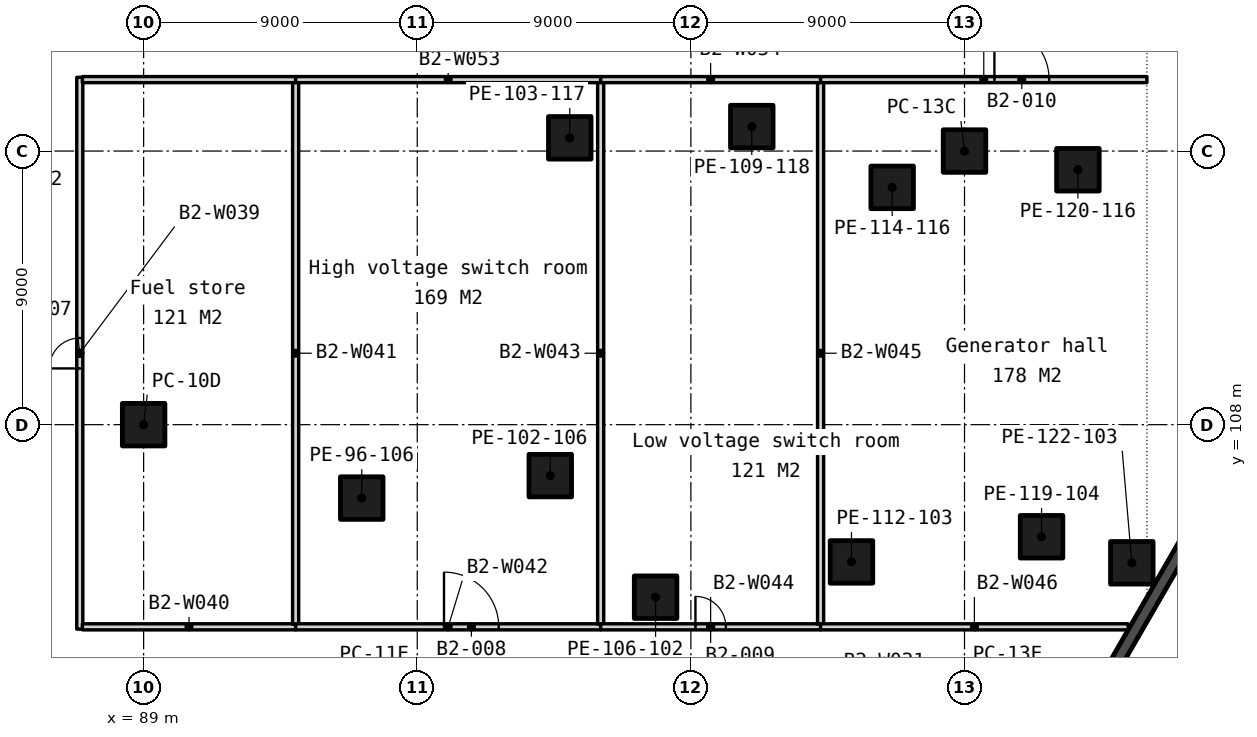
"""IFC4 building model, lengths in metres.
Left out: names, types, materials, properties, quantities, classifications, styles, units other than length and angle.
Written with IfcOpenShell. Run it as: python <this file> out.ifc"""

import sys

from ifc_helpers import new_model, si_unit, direction, frame, frame_2d, origin, origin_2d, place, context, subcontext, project, spatial, rectangle, extrude, element, fill, save


model = new_model("IFC4")
c1 = context("Model", 3, precision=1e-05, world=origin(), true_north=direction((0.0, 1.0)))
c2 = subcontext(c1, "Body", "Model", "MODEL_VIEW")
j1 = project(units=[si_unit("LENGTHUNIT", "METRE"), si_unit("PLANEANGLEUNIT", "RADIAN")], contexts=[c1])
p1 = place(None, origin())
s1 = spatial("IfcSite", under=j1, at=p1, CompositionType="ELEMENT")
p2 = place(p1, origin())
s2 = spatial("IfcBuilding", under=s1, at=p2, CompositionType="ELEMENT")
p3 = place(p2, frame((0.0, 0.0, -9.0)))
s3 = spatial("IfcBuildingStorey", under=s2, at=p3, CompositionType="ELEMENT", Elevation=-9.0)
p4 = place(p3, frame((137.688, 129.089, -0.3), z_axis=(0.0, 0.0, 1.0), x_axis=(-0.499999742059, -0.866025552707, 0.0)))
e1 = element("IfcWall", 1, at=p4, inside=s3, PredefinedType="SOLIDWALL", context=c2, shape_type="SweptSolid", body=[
    extrude(rectangle(XDim=105.659, YDim=0.4, at=frame_2d((52.829, 0.0))), origin(), (0.0, 0.0, 1.0), 4.55),
])
for number, where, z_axis, x_axis in (
    (2, (89.0, 108.0, 0.0), (0.0, 0.0, 1.0), (1.0, 0.0, 0.0)),
    (3, (116.0, 117.0, 0.0), (0.0, 0.0, 1.0), (1.0, 0.0, 0.0)),
    (4, (102.375, 106.325, 0.0), (0.0, 0.0, 1.0), (1.0, 0.0, 0.0)),
    (5, (103.016, 117.435, 0.0), (0.0, 0.0, 1.0), (1.0, 0.0, 0.0)),
    (6, (105.839, 102.325, 0.0), (0.0, 0.0, 1.0), (1.0, 0.0, 0.0)),
    (7, (109.003, 117.805, 0.0), (0.0, 0.0, 1.0), (1.0, 0.0, 0.0)),
    (8, (112.282, 103.485, 0.0), (0.0, 0.0, 1.0), (1.0, 0.0, 0.0)),
    (9, (113.621, 115.805, 0.0), (0.0, 0.0, 1.0), (1.0, 0.0, 0.0)),
    (10, (118.534, 104.313, 0.0), (0.0, 0.0, 1.0), (1.0, 0.0, 0.0)),
    (11, (119.73, 116.385, 0.0), (0.0, 0.0, 1.0), (1.0, 0.0, 0.0)),
    (12, (121.503, 103.456, 0.0), (0.0, 0.0, 1.0), (1.0, 0.0, 0.0)),
    (13, (96.174, 105.585, 0.0), (0.0, 0.0, 1.0), (1.0, 0.0, 0.0)),
):
    element("IfcColumn", number, at=place(p3, frame(where, z_axis=z_axis, x_axis=x_axis)), inside=s3, PredefinedType="COLUMN", context=c2, shape_type="SweptSolid", body=[
        extrude(rectangle(XDim=1.4, YDim=1.4, at=origin_2d()), origin(), (0.0, 0.0, 1.0), 4.5),
    ])
p5 = place(p3, frame((86.9, 101.275, 0.0), z_axis=(0.0, 0.0, 1.0), x_axis=(0.0, 1.0, 0.0)))
e14 = element("IfcWall", 14, at=p5, inside=s3, PredefinedType="PARTITIONING", context=c2, shape_type="SweptSolid", body=[
    extrude(rectangle(XDim=18.15, YDim=0.2, at=frame_2d((9.075, 0.0))), origin(), (0.0, 0.0, 1.0), 4.25),
])
p6 = place(p5, frame((8.575, 0.0, 0.0)))
e15 = element("IfcOpeningElement", 15, at=p6, cuts=e14, PredefinedType="OPENING", context=c2, shape_type="SweptSolid", body=[
    extrude(rectangle(XDim=1.0, YDim=2.1, at=frame_2d((0.5, 1.05))), frame((0.0, 0.11, 0.0), z_axis=(0.0, -1.0, 0.0), x_axis=(1.0, 0.0, 0.0)), (0.0, 0.0, 1.0), 0.22),
])
p7 = place(p3, frame((86.985, 101.35, 0.0), z_axis=(0.0, 0.0, 1.0), x_axis=(1.0, 0.0, 0.0)))
e16 = element("IfcWall", 16, at=p7, inside=s3, PredefinedType="PARTITIONING", context=c2, shape_type="SweptSolid", body=[
    extrude(rectangle(XDim=7.015, YDim=0.2, at=frame_2d((3.507, 0.0))), origin(), (0.0, 0.0, 1.0), 4.25),
])
p8 = place(p3, frame((94.0, 101.435, 0.0), z_axis=(0.0, 0.0, 1.0), x_axis=(0.0, 1.0, 0.0)))
e17 = element("IfcWall", 17, at=p8, inside=s3, PredefinedType="PARTITIONING", context=c2, shape_type="SweptSolid", body=[
    extrude(rectangle(XDim=17.83, YDim=0.2, at=frame_2d((8.915, 0.0))), origin(), (0.0, 0.0, 1.0), 4.25),
])
p9 = place(p3, frame((94.0, 101.35, 0.0), z_axis=(0.0, 0.0, 1.0), x_axis=(1.0, 0.0, 0.0)))
e18 = element("IfcWall", 18, at=p9, inside=s3, PredefinedType="PARTITIONING", context=c2, shape_type="SweptSolid", body=[
    extrude(rectangle(XDim=10.033, YDim=0.2, at=frame_2d((5.017, 0.0))), origin(), (0.0, 0.0, 1.0), 4.25),
])
p10 = place(p9, frame((4.88, 0.0, 0.0)))
e19 = element("IfcOpeningElement", 19, at=p10, cuts=e18, PredefinedType="OPENING", context=c2, shape_type="SweptSolid", body=[
    extrude(rectangle(XDim=1.8, YDim=2.1, at=frame_2d((0.9, 1.05))), frame((0.0, 0.11, 0.0), z_axis=(0.0, -1.0, 0.0), x_axis=(1.0, 0.0, 0.0)), (0.0, 0.0, 1.0), 0.22),
])
p11 = place(p3, frame((104.033, 101.435, 0.0), z_axis=(0.0, 0.0, 1.0), x_axis=(0.0, 1.0, 0.0)))
e20 = element("IfcWall", 20, at=p11, inside=s3, PredefinedType="PARTITIONING", context=c2, shape_type="SweptSolid", body=[
    extrude(rectangle(XDim=17.83, YDim=0.2, at=frame_2d((8.915, 0.0))), origin(), (0.0, 0.0, 1.0), 4.25),
])
p12 = place(p3, frame((104.033, 101.35, 0.0), z_axis=(0.0, 0.0, 1.0), x_axis=(1.0, 0.0, 0.0)))
e21 = element("IfcWall", 21, at=p12, inside=s3, PredefinedType="PARTITIONING", context=c2, shape_type="SweptSolid", body=[
    extrude(rectangle(XDim=7.233, YDim=0.2, at=frame_2d((3.617, 0.0))), origin(), (0.0, 0.0, 1.0), 4.25),
])
p13 = place(p12, frame((3.117, 0.0, 0.0)))
e22 = element("IfcOpeningElement", 22, at=p13, cuts=e21, PredefinedType="OPENING", context=c2, shape_type="SweptSolid", body=[
    extrude(rectangle(XDim=1.0, YDim=2.1, at=frame_2d((0.5, 1.05))), frame((0.0, 0.11, 0.0), z_axis=(0.0, -1.0, 0.0), x_axis=(1.0, 0.0, 0.0)), (0.0, 0.0, 1.0), 0.22),
])
p14 = place(p3, frame((111.267, 101.435, 0.0), z_axis=(0.0, 0.0, 1.0), x_axis=(0.0, 1.0, 0.0)))
e23 = element("IfcWall", 23, at=p14, inside=s3, PredefinedType="PARTITIONING", context=c2, shape_type="SweptSolid", body=[
    extrude(rectangle(XDim=17.83, YDim=0.2, at=frame_2d((8.915, 0.0))), origin(), (0.0, 0.0, 1.0), 4.25),
])
p15 = place(p3, frame((111.267, 101.35, 0.0), z_axis=(0.0, 0.0, 1.0), x_axis=(1.0, 0.0, 0.0)))
e24 = element("IfcWall", 24, at=p15, inside=s3, PredefinedType="PARTITIONING", context=c2, shape_type="SweptSolid", body=[
    extrude(rectangle(XDim=10.118, YDim=0.2, at=frame_2d((5.059, 0.0))), origin(), (0.0, 0.0, 1.0), 4.25),
])
p16 = place(p3, frame((86.985, 119.35, 0.0), z_axis=(0.0, 0.0, 1.0), x_axis=(1.0, 0.0, 0.0)))
e25 = element("IfcWall", 25, at=p16, inside=s3, PredefinedType="PARTITIONING", context=c2, shape_type="SweptSolid", body=[
    extrude(rectangle(XDim=7.015, YDim=0.2, at=frame_2d((3.507, 0.0))), origin(), (0.0, 0.0, 1.0), 4.25),
])
p17 = place(p3, frame((94.0, 119.35, 0.0), z_axis=(0.0, 0.0, 1.0), x_axis=(1.0, 0.0, 0.0)))
e26 = element("IfcWall", 26, at=p17, inside=s3, PredefinedType="PARTITIONING", context=c2, shape_type="SweptSolid", body=[
    extrude(rectangle(XDim=10.033, YDim=0.2, at=frame_2d((5.017, 0.0))), origin(), (0.0, 0.0, 1.0), 4.25),
])
p18 = place(p3, frame((104.033, 119.35, 0.0), z_axis=(0.0, 0.0, 1.0), x_axis=(1.0, 0.0, 0.0)))
e27 = element("IfcWall", 27, at=p18, inside=s3, PredefinedType="PARTITIONING", context=c2, shape_type="SweptSolid", body=[
    extrude(rectangle(XDim=7.233, YDim=0.2, at=frame_2d((3.617, 0.0))), origin(), (0.0, 0.0, 1.0), 4.25),
])
p19 = place(p3, frame((111.267, 119.35, 0.0), z_axis=(0.0, 0.0, 1.0), x_axis=(1.0, 0.0, 0.0)))
e28 = element("IfcWall", 28, at=p19, inside=s3, PredefinedType="PARTITIONING", context=c2, shape_type="SweptSolid", body=[
    extrude(rectangle(XDim=10.733, YDim=0.2, at=frame_2d((5.367, 0.0))), origin(), (0.0, 0.0, 1.0), 4.25),
])
p20 = place(p19, frame((5.717, 0.0, 0.0)))
e29 = element("IfcOpeningElement", 29, at=p20, cuts=e28, PredefinedType="OPENING", context=c2, shape_type="SweptSolid", body=[
    extrude(rectangle(XDim=1.8, YDim=2.1, at=frame_2d((0.9, 1.05))), frame((0.0, 0.11, 0.0), z_axis=(0.0, -1.0, 0.0), x_axis=(1.0, 0.0, 0.0)), (0.0, 0.0, 1.0), 0.22),
])
p21 = place(p6, origin())
e30 = element("IfcDoor", 30, at=p21, inside=s3, OperationType="SINGLE_SWING_LEFT", PredefinedType="DOOR", context=c2, shape_type="SweptSolid", body=[
    extrude(rectangle(XDim=1.0, YDim=2.1, at=frame_2d((0.5, 1.05))), frame((0.0, 0.025, 0.0), z_axis=(0.0, -1.0, 0.0), x_axis=(1.0, 0.0, 0.0)), (0.0, 0.0, 1.0), 0.05),
])
fill(e15, e30)
p22 = place(p10, origin())
e31 = element("IfcDoor", 31, at=p22, inside=s3, OperationType="SINGLE_SWING_LEFT", PredefinedType="DOOR", context=c2, shape_type="SweptSolid", body=[
    extrude(rectangle(XDim=1.8, YDim=2.1, at=frame_2d((0.9, 1.05))), frame((0.0, 0.025, 0.0), z_axis=(0.0, -1.0, 0.0), x_axis=(1.0, 0.0, 0.0)), (0.0, 0.0, 1.0), 0.05),
])
fill(e19, e31)
p23 = place(p13, origin())
e32 = element("IfcDoor", 32, at=p23, inside=s3, OperationType="SINGLE_SWING_LEFT", PredefinedType="DOOR", context=c2, shape_type="SweptSolid", body=[
    extrude(rectangle(XDim=1.0, YDim=2.1, at=frame_2d((0.5, 1.05))), frame((0.0, 0.025, 0.0), z_axis=(0.0, -1.0, 0.0), x_axis=(1.0, 0.0, 0.0)), (0.0, 0.0, 1.0), 0.05),
])
fill(e22, e32)
p24 = place(p20, origin())
e33 = element("IfcDoor", 33, at=p24, inside=s3, OperationType="SINGLE_SWING_LEFT", PredefinedType="DOOR", context=c2, shape_type="SweptSolid", body=[
    extrude(rectangle(XDim=1.8, YDim=2.1, at=frame_2d((0.9, 1.05))), frame((0.0, 0.025, 0.0), z_axis=(0.0, -1.0, 0.0), x_axis=(1.0, 0.0, 0.0)), (0.0, 0.0, 1.0), 0.05),
])
fill(e29, e33)
save(model, sys.argv[1])
